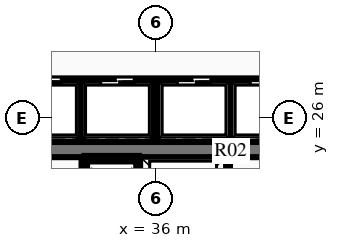
"""IFC4 building model, lengths in metres.
Left out: names, types, materials, properties, quantities, classifications, styles, units other than length and angle.
Written with IfcOpenShell. Run it as: python <this file> out.ifc"""

import sys

from ifc_helpers import new_model, si_unit, direction, frame, frame_2d, origin, place, context, subcontext, project, spatial, rectangle, extrude, element, fill, save


model = new_model("IFC4")
c1 = context("Model", 3, precision=1e-05, world=origin(), true_north=direction((0.0, 1.0)))
c2 = subcontext(c1, "Body", "Model", "MODEL_VIEW")
j1 = project(units=[si_unit("LENGTHUNIT", "METRE"), si_unit("PLANEANGLEUNIT", "RADIAN")], contexts=[c1])
p1 = place(None, origin())
s1 = spatial("IfcSite", under=j1, at=p1, CompositionType="ELEMENT")
p2 = place(p1, origin())
s2 = spatial("IfcBuilding", under=s1, at=p2, CompositionType="ELEMENT")
p3 = place(p2, frame((0.0, 0.0, 228.45)))
s3 = spatial("IfcBuildingStorey", under=s2, at=p3, CompositionType="ELEMENT", Elevation=228.45)
p4 = place(p3, frame((31.31, 24.95, 0.0), z_axis=(0.0, 0.0, 1.0), x_axis=(1.0, 0.0, 0.0)))
e1 = element("IfcWall", 1, at=p4, inside=s3, PredefinedType="SHEAR", context=c2, shape_type="SweptSolid", body=[
    extrude(rectangle(XDim=9.38, YDim=0.5, at=frame_2d((4.69, 0.0))), origin(), (0.0, 0.0, 1.0), 3.75),
])
for number, where, z_axis, x_axis in (
    (2, (33.65, 22.05, 0.0), (0.0, 0.0, 1.0), (0.0, 1.0, 0.0)),
    (3, (35.45, 22.05, 0.0), (0.0, 0.0, 1.0), (0.0, 1.0, 0.0)),
):
    element("IfcWall", number, at=place(p3, frame(where, z_axis=z_axis, x_axis=x_axis)), inside=s3, PredefinedType="PARTITIONING", context=c2, shape_type="SweptSolid", body=[
        extrude(rectangle(XDim=2.6, YDim=0.18, at=frame_2d((1.3, 0.0))), origin(), (0.0, 0.0, 1.0), 3.47),
    ])
p5 = place(p3, frame((33.65, 24.65, 0.0), z_axis=(0.0, 0.0, 1.0), x_axis=(1.0, 0.0, 0.0)))
e4 = element("IfcWall", 4, at=p5, inside=s3, PredefinedType="PARTITIONING", context=c2, shape_type="SweptSolid", body=[
    extrude(rectangle(XDim=1.8, YDim=0.18, at=frame_2d((0.9, 0.0))), origin(), (0.0, 0.0, 1.0), 3.47),
])
p6 = place(p3, frame((38.35, 22.05, 0.0), z_axis=(0.0, 0.0, 1.0), x_axis=(0.0, 1.0, 0.0)))
e5 = element("IfcWall", 5, at=p6, inside=s3, PredefinedType="PARTITIONING", context=c2, shape_type="SweptSolid", body=[
    extrude(rectangle(XDim=2.6, YDim=0.18, at=frame_2d((1.3, 0.0))), origin(), (0.0, 0.0, 1.0), 3.47),
])
p7 = place(p3, frame((31.2, 27.2, 0.0), z_axis=(0.0, 0.0, 1.0), x_axis=(1.0, 0.0, 0.0)))
e6 = element("IfcWall", 6, at=p7, inside=s3, PredefinedType="PARTITIONING", context=c2, shape_type="SweptSolid", body=[
    extrude(rectangle(XDim=9.6, YDim=0.18, at=frame_2d((4.8, 0.0))), origin(), (0.0, 0.0, 1.0), 3.47),
])
p8 = place(p7, frame((0.59, 0.0, 0.0)))
e7 = element("IfcOpeningElement", 7, at=p8, cuts=e6, PredefinedType="OPENING", context=c2, shape_type="SweptSolid", body=[
    extrude(rectangle(XDim=1.1, YDim=2.15, at=frame_2d((0.55, 1.075))), frame((0.0, 0.1, 0.0), z_axis=(0.0, -1.0, 0.0), x_axis=(1.0, 0.0, 0.0)), (0.0, 0.0, 1.0), 0.2),
])
p9 = place(p7, frame((2.99, 0.0, 0.0)))
e8 = element("IfcOpeningElement", 8, at=p9, cuts=e6, PredefinedType="OPENING", context=c2, shape_type="SweptSolid", body=[
    extrude(rectangle(XDim=1.1, YDim=2.15, at=frame_2d((0.55, 1.075))), frame((0.0, 0.1, 0.0), z_axis=(0.0, -1.0, 0.0), x_axis=(1.0, 0.0, 0.0)), (0.0, 0.0, 1.0), 0.2),
])
p10 = place(p7, frame((5.51, 0.0, 0.0)))
e9 = element("IfcOpeningElement", 9, at=p10, cuts=e6, PredefinedType="OPENING", context=c2, shape_type="SweptSolid", body=[
    extrude(rectangle(XDim=1.1, YDim=2.15, at=frame_2d((0.55, 1.075))), frame((0.0, 0.1, 0.0), z_axis=(0.0, -1.0, 0.0), x_axis=(1.0, 0.0, 0.0)), (0.0, 0.0, 1.0), 0.2),
])
p11 = place(p7, frame((7.91, 0.0, 0.0)))
e10 = element("IfcOpeningElement", 10, at=p11, cuts=e6, PredefinedType="OPENING", context=c2, shape_type="SweptSolid", body=[
    extrude(rectangle(XDim=1.1, YDim=2.15, at=frame_2d((0.55, 1.075))), frame((0.0, 0.1, 0.0), z_axis=(0.0, -1.0, 0.0), x_axis=(1.0, 0.0, 0.0)), (0.0, 0.0, 1.0), 0.2),
])
for number, where, z_axis, x_axis in (
    (11, (33.54, 25.3, 0.0), (0.0, 0.0, 1.0), (0.0, 1.0, 0.0)),
    (12, (36.0, 25.3, 0.0), (0.0, 0.0, 1.0), (0.0, 1.0, 0.0)),
    (13, (38.46, 25.3, 0.0), (0.0, 0.0, 1.0), (0.0, 1.0, 0.0)),
):
    element("IfcWall", number, at=place(p3, frame(where, z_axis=z_axis, x_axis=x_axis)), inside=s3, PredefinedType="PARTITIONING", context=c2, shape_type="SweptSolid", body=[
        extrude(rectangle(XDim=1.9, YDim=0.18, at=frame_2d((0.95, 0.0))), origin(), (0.0, 0.0, 1.0), 3.47),
    ])
p12 = place(p8, origin())
e14 = element("IfcDoor", 14, at=p12, inside=s3, OperationType="SLIDING_TO_LEFT", PredefinedType="DOOR", context=c2, shape_type="SweptSolid", body=[
    extrude(rectangle(XDim=1.1, YDim=2.15, at=frame_2d((0.55, 1.075))), frame((0.0, 0.025, 0.0), z_axis=(0.0, -1.0, 0.0), x_axis=(1.0, 0.0, 0.0)), (0.0, 0.0, 1.0), 0.05),
])
fill(e7, e14)
p13 = place(p9, origin())
e15 = element("IfcDoor", 15, at=p13, inside=s3, OperationType="SLIDING_TO_LEFT", PredefinedType="DOOR", context=c2, shape_type="SweptSolid", body=[
    extrude(rectangle(XDim=1.1, YDim=2.15, at=frame_2d((0.55, 1.075))), frame((0.0, 0.025, 0.0), z_axis=(0.0, -1.0, 0.0), x_axis=(1.0, 0.0, 0.0)), (0.0, 0.0, 1.0), 0.05),
])
fill(e8, e15)
p14 = place(p10, origin())
e16 = element("IfcDoor", 16, at=p14, inside=s3, OperationType="SLIDING_TO_LEFT", PredefinedType="DOOR", context=c2, shape_type="SweptSolid", body=[
    extrude(rectangle(XDim=1.1, YDim=2.15, at=frame_2d((0.55, 1.075))), frame((0.0, 0.025, 0.0), z_axis=(0.0, -1.0, 0.0), x_axis=(1.0, 0.0, 0.0)), (0.0, 0.0, 1.0), 0.05),
])
fill(e9, e16)
p15 = place(p11, origin())
e17 = element("IfcDoor", 17, at=p15, inside=s3, OperationType="SLIDING_TO_LEFT", PredefinedType="DOOR", context=c2, shape_type="SweptSolid", body=[
    extrude(rectangle(XDim=1.1, YDim=2.15, at=frame_2d((0.55, 1.075))), frame((0.0, 0.025, 0.0), z_axis=(0.0, -1.0, 0.0), x_axis=(1.0, 0.0, 0.0)), (0.0, 0.0, 1.0), 0.05),
])
fill(e10, e17)
save(model, sys.argv[1])
